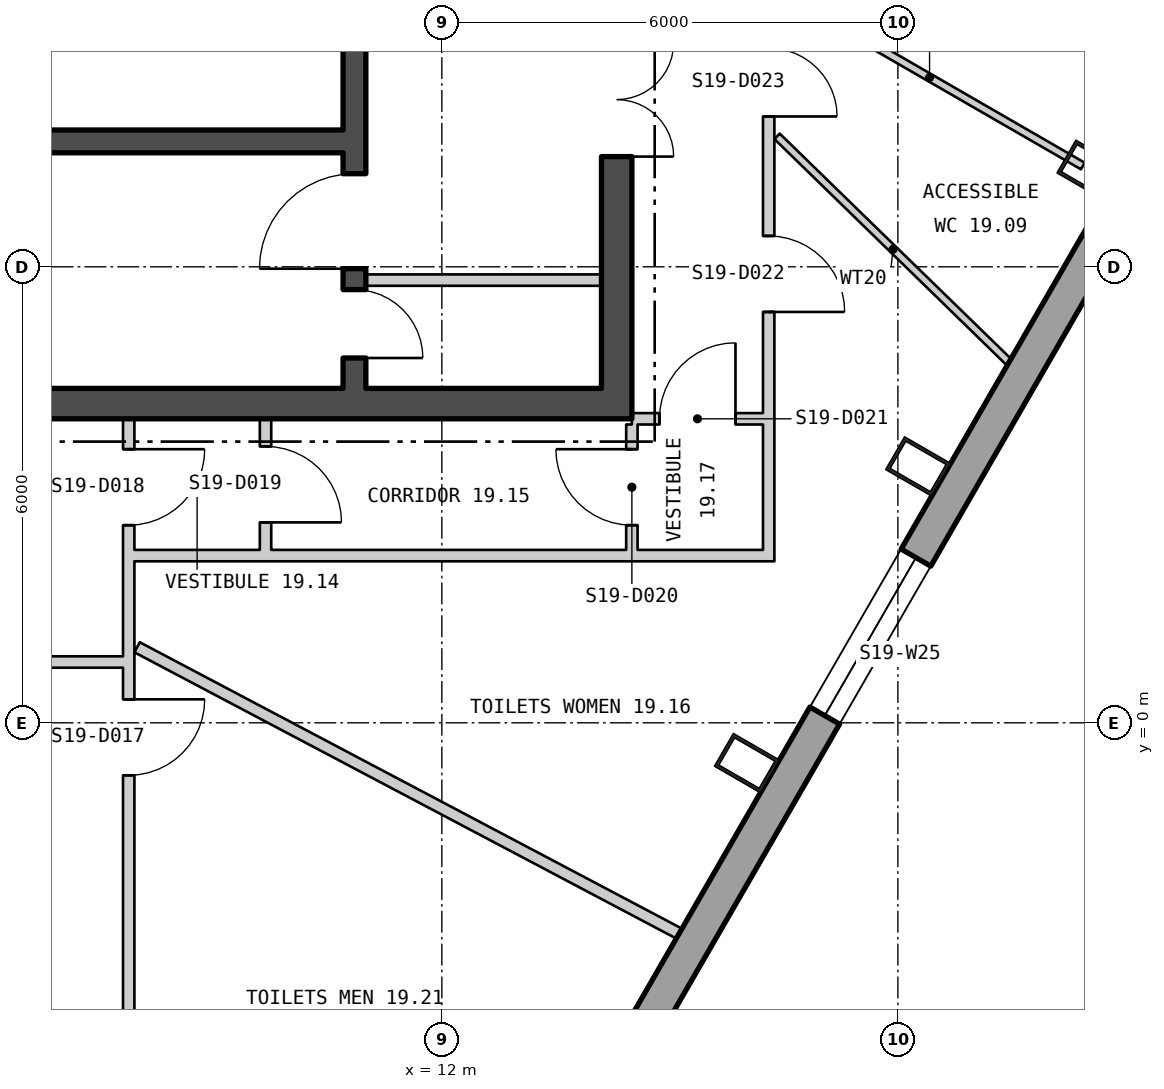
"""IFC4 building model, lengths in metres.
Left out: names, types, materials, properties, quantities, classifications, styles, units other than length and angle.
Written with IfcOpenShell. Run it as: python <this file> out.ifc"""

import sys

from ifc_helpers import new_model, si_unit, direction, frame, frame_2d, origin, origin_2d, place, context, subcontext, project, spatial, polyline, rectangle, hollow_rectangle, outline, extrude, element, fill, save


model = new_model("IFC4")
c1 = context("Model", 3, precision=1e-05, world=origin(), true_north=direction((0.0, 1.0)))
c2 = subcontext(c1, "Body", "Model", "MODEL_VIEW")
j1 = project(units=[si_unit("LENGTHUNIT", "METRE"), si_unit("PLANEANGLEUNIT", "RADIAN")], contexts=[c1])
p1 = place(None, origin())
s1 = spatial("IfcSite", under=j1, at=p1, CompositionType="ELEMENT")
p2 = place(p1, origin())
s2 = spatial("IfcBuilding", under=s1, at=p2, CompositionType="ELEMENT")
p3 = place(p2, frame((0.0, 0.0, 257.1)))
s3 = spatial("IfcBuildingStorey", under=s2, at=p3, CompositionType="ELEMENT", Elevation=257.1)
for number, where, z_axis, x_axis in (
    (1, (16.013, -0.53, 0.0), (0.0, 0.0, 1.0), (0.5, 0.866, 0.0)),
    (2, (18.266, 3.373, 0.0), (0.0, 0.0, 1.0), (0.5, 0.866, 0.0)),
    (3, (20.52, 7.276, 0.0), (0.0, 0.0, 1.0), (0.5, 0.866, 0.0)),
):
    element("IfcColumn", number, at=place(p3, frame(where, z_axis=z_axis, x_axis=x_axis)), inside=s3, PredefinedType="COLUMN", context=c2, shape_type="SweptSolid", body=[
        extrude(hollow_rectangle(XDim=0.5, YDim=0.7, WallThickness=0.045, at=origin_2d()), origin(), (0.0, 0.0, 1.0), 3.9),
    ])
p4 = place(p3, frame((2.825, -24.522, -0.18), z_axis=(0.0, 0.0, 1.0), x_axis=(0.500000141277, 0.866025322218, 0.0)))
e4 = element("IfcWall", 4, at=p4, inside=s3, PredefinedType="SOLIDWALL", context=c2, shape_type="SweptSolid", body=[
    extrude(outline(polyline([(-0.13, -0.225), (45.86, -0.225), (45.6, 0.225), (0.13, 0.225), (-0.13, -0.225)])), origin(), (0.0, 0.0, 1.0), 3.68),
])
p5 = place(p4, frame((1.424, 0.0, 1.08)))
e5 = element("IfcOpeningElement", 5, at=p5, cuts=e4, PredefinedType="OPENING", context=c2, shape_type="SweptSolid", body=[
    extrude(rectangle(XDim=2.4, YDim=2.0, at=frame_2d((1.2, 1.0))), frame((0.0, 0.235, 0.0), z_axis=(0.0, -1.0, 0.0), x_axis=(1.0, 0.0, 0.0)), (0.0, 0.0, 1.0), 0.47),
])
p6 = place(p4, frame((5.892, 0.0, 1.08)))
e6 = element("IfcOpeningElement", 6, at=p6, cuts=e4, PredefinedType="OPENING", context=c2, shape_type="SweptSolid", body=[
    extrude(rectangle(XDim=2.4, YDim=2.0, at=frame_2d((1.2, 1.0))), frame((0.0, 0.235, 0.0), z_axis=(0.0, -1.0, 0.0), x_axis=(1.0, 0.0, 0.0)), (0.0, 0.0, 1.0), 0.47),
])
p7 = place(p4, frame((10.399, 0.0, 1.08)))
e7 = element("IfcOpeningElement", 7, at=p7, cuts=e4, PredefinedType="OPENING", context=c2, shape_type="SweptSolid", body=[
    extrude(rectangle(XDim=2.4, YDim=2.0, at=frame_2d((1.2, 1.0))), frame((0.0, 0.235, 0.0), z_axis=(0.0, -1.0, 0.0), x_axis=(1.0, 0.0, 0.0)), (0.0, 0.0, 1.0), 0.47),
])
p8 = place(p4, frame((14.905, 0.0, 1.08)))
e8 = element("IfcOpeningElement", 8, at=p8, cuts=e4, PredefinedType="OPENING", context=c2, shape_type="SweptSolid", body=[
    extrude(rectangle(XDim=2.4, YDim=2.0, at=frame_2d((1.2, 1.0))), frame((0.0, 0.235, 0.0), z_axis=(0.0, -1.0, 0.0), x_axis=(1.0, 0.0, 0.0)), (0.0, 0.0, 1.0), 0.47),
])
p9 = place(p4, frame((19.412, 0.0, 1.08)))
e9 = element("IfcOpeningElement", 9, at=p9, cuts=e4, PredefinedType="OPENING", context=c2, shape_type="SweptSolid", body=[
    extrude(rectangle(XDim=2.4, YDim=2.0, at=frame_2d((1.2, 1.0))), frame((0.0, 0.235, 0.0), z_axis=(0.0, -1.0, 0.0), x_axis=(1.0, 0.0, 0.0)), (0.0, 0.0, 1.0), 0.47),
])
p10 = place(p4, frame((28.425, 0.0, 1.08)))
e10 = element("IfcOpeningElement", 10, at=p10, cuts=e4, PredefinedType="OPENING", context=c2, shape_type="SweptSolid", body=[
    extrude(rectangle(XDim=2.4, YDim=2.0, at=frame_2d((1.2, 1.0))), frame((0.0, 0.235, 0.0), z_axis=(0.0, -1.0, 0.0), x_axis=(1.0, 0.0, 0.0)), (0.0, 0.0, 1.0), 0.47),
])
p11 = place(p4, frame((37.438, 0.0, 1.08)))
e11 = element("IfcOpeningElement", 11, at=p11, cuts=e4, PredefinedType="OPENING", context=c2, shape_type="SweptSolid", body=[
    extrude(rectangle(XDim=2.4, YDim=2.0, at=frame_2d((1.2, 1.0))), frame((0.0, 0.235, 0.0), z_axis=(0.0, -1.0, 0.0), x_axis=(1.0, 0.0, 0.0)), (0.0, 0.0, 1.0), 0.47),
])
p12 = place(p4, frame((41.907, 0.0, 1.08)))
e12 = element("IfcOpeningElement", 12, at=p12, cuts=e4, PredefinedType="OPENING", context=c2, shape_type="SweptSolid", body=[
    extrude(rectangle(XDim=2.4, YDim=2.0, at=frame_2d((1.2, 1.0))), frame((0.0, 0.235, 0.0), z_axis=(0.0, -1.0, 0.0), x_axis=(1.0, 0.0, 0.0)), (0.0, 0.0, 1.0), 0.47),
])
p13 = place(p3, frame((-14.5, 4.2, 0.0), z_axis=(0.0, 0.0, 1.0), x_axis=(1.0, 0.0, 0.0)))
e13 = element("IfcWall", 13, at=p13, inside=s3, PredefinedType="SHEAR", context=c2, shape_type="SweptSolid", body=[
    extrude(rectangle(XDim=29.0, YDim=0.4, at=frame_2d((14.5, 0.0))), origin(), (0.0, 0.0, 1.0), 3.7),
])
p14 = place(p13, frame((9.0, 0.0, 0.0)))
e14 = element("IfcOpeningElement", 14, at=p14, cuts=e13, PredefinedType="OPENING", context=c2, shape_type="SweptSolid", body=[
    extrude(rectangle(XDim=1.8, YDim=2.4, at=frame_2d((0.9, 1.2))), frame((0.0, 0.21, 0.0), z_axis=(0.0, -1.0, 0.0), x_axis=(1.0, 0.0, 0.0)), (0.0, 0.0, 1.0), 0.42),
])
p15 = place(p13, frame((19.0, 0.0, 0.0)))
e15 = element("IfcOpeningElement", 15, at=p15, cuts=e13, PredefinedType="OPENING", context=c2, shape_type="SweptSolid", body=[
    extrude(rectangle(XDim=1.8, YDim=2.4, at=frame_2d((0.9, 1.2))), frame((0.0, 0.21, 0.0), z_axis=(0.0, -1.0, 0.0), x_axis=(1.0, 0.0, 0.0)), (0.0, 0.0, 1.0), 0.42),
])
p16 = place(p3, frame((14.3, 4.4, 0.0), z_axis=(0.0, 0.0, 1.0), x_axis=(0.0, 1.0, 0.0)))
e16 = element("IfcWall", 16, at=p16, inside=s3, PredefinedType="SHEAR", context=c2, shape_type="SweptSolid", body=[
    extrude(rectangle(XDim=13.2, YDim=0.4, at=frame_2d((6.6, 0.0))), origin(), (0.0, 0.0, 1.0), 3.7),
])
p17 = place(p16, frame((3.05, 0.0, 0.0)))
e17 = element("IfcOpeningElement", 17, at=p17, cuts=e16, PredefinedType="OPENING", context=c2, shape_type="SweptSolid", body=[
    extrude(rectangle(XDim=1.5, YDim=2.1, at=frame_2d((0.75, 1.05))), frame((0.0, 0.21, 0.0), z_axis=(0.0, -1.0, 0.0), x_axis=(1.0, 0.0, 0.0)), (0.0, 0.0, 1.0), 0.42),
])
p18 = place(p3, frame((10.85, 4.4, 0.0), z_axis=(0.0, 0.0, 1.0), x_axis=(0.0, 1.0, 0.0)))
e18 = element("IfcWall", 18, at=p18, inside=s3, PredefinedType="SHEAR", context=c2, shape_type="SweptSolid", body=[
    extrude(rectangle(XDim=13.2, YDim=0.3, at=frame_2d((6.6, 0.0))), origin(), (0.0, 0.0, 1.0), 3.7),
])
p19 = place(p18, frame((1.575, 0.0, 0.0)))
e19 = element("IfcOpeningElement", 19, at=p19, cuts=e18, PredefinedType="OPENING", context=c2, shape_type="SweptSolid", body=[
    extrude(rectangle(XDim=1.25, YDim=2.1, at=frame_2d((0.625, 1.05))), frame((0.0, 0.16, 0.0), z_axis=(0.0, -1.0, 0.0), x_axis=(1.0, 0.0, 0.0)), (0.0, 0.0, 1.0), 0.32),
])
p20 = place(p18, frame((0.4, 0.0, 0.0)))
e20 = element("IfcOpeningElement", 20, at=p20, cuts=e18, PredefinedType="OPENING", context=c2, shape_type="SweptSolid", body=[
    extrude(rectangle(XDim=0.9, YDim=2.1, at=frame_2d((0.45, 1.05))), frame((0.0, 0.16, 0.0), z_axis=(0.0, -1.0, 0.0), x_axis=(1.0, 0.0, 0.0)), (0.0, 0.0, 1.0), 0.32),
])
p21 = place(p3, frame((2.6, 7.65, 0.0), z_axis=(0.0, 0.0, 1.0), x_axis=(1.0, 0.0, 0.0)))
e21 = element("IfcWall", 21, at=p21, inside=s3, PredefinedType="SHEAR", context=c2, shape_type="SweptSolid", body=[
    extrude(rectangle(XDim=8.1, YDim=0.3, at=frame_2d((4.05, 0.0))), origin(), (0.0, 0.0, 1.0), 3.7),
])
p22 = place(p3, frame((11.0, 5.825, 0.0), z_axis=(0.0, 0.0, 1.0), x_axis=(1.0, 0.0, 0.0)))
e22 = element("IfcWall", 22, at=p22, inside=s3, PredefinedType="PARTITIONING", context=c2, shape_type="SweptSolid", body=[
    extrude(rectangle(XDim=3.1, YDim=0.15, at=frame_2d((1.55, 0.0))), origin(), (0.0, 0.0, 1.0), 3.7),
])
p23 = place(p3, frame((-7.805, 0.8, 0.0), z_axis=(0.0, 0.0, 1.0), x_axis=(1.0, 0.0, 0.0)))
e23 = element("IfcWall", 23, at=p23, inside=s3, PredefinedType="PARTITIONING", context=c2, shape_type="SweptSolid", body=[
    extrude(rectangle(XDim=15.61, YDim=0.15, at=frame_2d((7.805, 0.0))), origin(), (0.0, 0.0, 1.0), 3.7),
])
p24 = place(p23, frame((1.168, 0.0, 0.0)))
e24 = element("IfcOpeningElement", 24, at=p24, cuts=e23, PredefinedType="OPENING", context=c2, shape_type="SweptSolid", body=[
    extrude(rectangle(XDim=1.0, YDim=2.1, at=frame_2d((0.5, 1.05))), frame((0.0, 0.085, 0.0), z_axis=(0.0, -1.0, 0.0), x_axis=(1.0, 0.0, 0.0)), (0.0, 0.0, 1.0), 0.17),
])
p25 = place(p23, frame((6.399, 0.0, 0.0)))
e25 = element("IfcOpeningElement", 25, at=p25, cuts=e23, PredefinedType="OPENING", context=c2, shape_type="SweptSolid", body=[
    extrude(rectangle(XDim=1.0, YDim=2.1, at=frame_2d((0.5, 1.05))), frame((0.0, 0.085, 0.0), z_axis=(0.0, -1.0, 0.0), x_axis=(1.0, 0.0, 0.0)), (0.0, 0.0, 1.0), 0.17),
])
p26 = place(p23, frame((8.006, 0.0, 0.0)))
e26 = element("IfcOpeningElement", 26, at=p26, cuts=e23, PredefinedType="OPENING", context=c2, shape_type="SweptSolid", body=[
    extrude(rectangle(XDim=1.0, YDim=2.1, at=frame_2d((0.5, 1.05))), frame((0.0, 0.085, 0.0), z_axis=(0.0, -1.0, 0.0), x_axis=(1.0, 0.0, 0.0)), (0.0, 0.0, 1.0), 0.17),
])
p27 = place(p23, frame((13.441, 0.0, 0.0)))
e27 = element("IfcOpeningElement", 27, at=p27, cuts=e23, PredefinedType="OPENING", context=c2, shape_type="SweptSolid", body=[
    extrude(rectangle(XDim=1.0, YDim=2.1, at=frame_2d((0.5, 1.05))), frame((0.0, 0.085, 0.0), z_axis=(0.0, -1.0, 0.0), x_axis=(1.0, 0.0, 0.0)), (0.0, 0.0, 1.0), 0.17),
])
p28 = place(p3, frame((7.88, -13.675, 0.0), z_axis=(0.0, 0.0, 1.0), x_axis=(0.0, 1.0, 0.0)))
e28 = element("IfcWall", 28, at=p28, inside=s3, PredefinedType="PARTITIONING", context=c2, shape_type="SweptSolid", body=[
    extrude(rectangle(XDim=17.675, YDim=0.15, at=frame_2d((8.838, 0.0))), origin(), (0.0, 0.0, 1.0), 3.7),
])
p29 = place(p28, frame((12.984, 0.0, 0.0)))
e29 = element("IfcOpeningElement", 29, at=p29, cuts=e28, PredefinedType="OPENING", context=c2, shape_type="SweptSolid", body=[
    extrude(rectangle(XDim=1.0, YDim=2.1, at=frame_2d((0.5, 1.05))), frame((0.0, 0.085, 0.0), z_axis=(0.0, -1.0, 0.0), x_axis=(1.0, 0.0, 0.0)), (0.0, 0.0, 1.0), 0.17),
])
p30 = place(p28, frame((16.275, 0.0, 0.0)))
e30 = element("IfcOpeningElement", 30, at=p30, cuts=e28, PredefinedType="OPENING", context=c2, shape_type="SweptSolid", body=[
    extrude(rectangle(XDim=1.0, YDim=2.1, at=frame_2d((0.5, 1.05))), frame((0.0, 0.085, 0.0), z_axis=(0.0, -1.0, 0.0), x_axis=(1.0, 0.0, 0.0)), (0.0, 0.0, 1.0), 0.17),
])
p31 = place(p3, frame((7.955, 2.2, 0.0), z_axis=(0.0, 0.0, 1.0), x_axis=(1.0, 0.0, 0.0)))
e31 = element("IfcWall", 31, at=p31, inside=s3, PredefinedType="PARTITIONING", context=c2, shape_type="SweptSolid", body=[
    extrude(rectangle(XDim=8.27, YDim=0.15, at=frame_2d((4.135, 0.0))), origin(), (0.0, 0.0, 1.0), 3.7),
])
p32 = place(p3, frame((7.99, 0.994, 0.0), z_axis=(0.0, 0.0, 1.0), x_axis=(0.88420981039, -0.467089939102, 0.0)))
e32 = element("IfcWall", 32, at=p32, inside=s3, PredefinedType="PARTITIONING", context=c2, shape_type="SweptSolid", body=[
    extrude(rectangle(XDim=8.065, YDim=0.15, at=frame_2d((4.032, 0.0))), origin(), (0.0, 0.0, 1.0), 3.7),
])
p33 = place(p3, frame((9.68, 2.275, 0.0), z_axis=(0.0, 0.0, 1.0), x_axis=(0.0, 1.0, 0.0)))
e33 = element("IfcWall", 33, at=p33, inside=s3, PredefinedType="PARTITIONING", context=c2, shape_type="SweptSolid", body=[
    extrude(rectangle(XDim=1.725, YDim=0.15, at=frame_2d((0.863, 0.0))), origin(), (0.0, 0.0, 1.0), 3.7),
])
p34 = place(p33, frame((0.362, 0.0, 0.0)))
e34 = element("IfcOpeningElement", 34, at=p34, cuts=e33, PredefinedType="OPENING", context=c2, shape_type="SweptSolid", body=[
    extrude(rectangle(XDim=1.0, YDim=2.1, at=frame_2d((0.5, 1.05))), frame((0.0, 0.085, 0.0), z_axis=(0.0, -1.0, 0.0), x_axis=(1.0, 0.0, 0.0)), (0.0, 0.0, 1.0), 0.17),
])
p35 = place(p3, frame((14.5, 2.275, 0.0), z_axis=(0.0, 0.0, 1.0), x_axis=(0.0, 1.0, 0.0)))
e35 = element("IfcWall", 35, at=p35, inside=s3, PredefinedType="PARTITIONING", context=c2, shape_type="SweptSolid", body=[
    extrude(rectangle(XDim=1.65, YDim=0.15, at=frame_2d((0.825, 0.0))), origin(), (0.0, 0.0, 1.0), 3.7),
])
p36 = place(p35, frame((0.325, 0.0, 0.0)))
e36 = element("IfcOpeningElement", 36, at=p36, cuts=e35, PredefinedType="OPENING", context=c2, shape_type="SweptSolid", body=[
    extrude(rectangle(XDim=1.0, YDim=2.1, at=frame_2d((0.5, 1.05))), frame((0.0, 0.085, 0.0), z_axis=(0.0, -1.0, 0.0), x_axis=(1.0, 0.0, 0.0)), (0.0, 0.0, 1.0), 0.17),
])
p37 = place(p3, frame((14.5, 4.0, 0.0), z_axis=(0.0, 0.0, 1.0), x_axis=(1.0, 0.0, 0.0)))
e37 = element("IfcWall", 37, at=p37, inside=s3, PredefinedType="PARTITIONING", context=c2, shape_type="SweptSolid", body=[
    extrude(rectangle(XDim=1.725, YDim=0.15, at=frame_2d((0.863, 0.0))), origin(), (0.0, 0.0, 1.0), 3.16),
])
p38 = place(p37, frame((0.363, 0.0, 0.0)))
e38 = element("IfcOpeningElement", 38, at=p38, cuts=e37, PredefinedType="OPENING", context=c2, shape_type="SweptSolid", body=[
    extrude(rectangle(XDim=1.0, YDim=2.1, at=frame_2d((0.5, 1.05))), frame((0.0, 0.085, 0.0), z_axis=(0.0, -1.0, 0.0), x_axis=(1.0, 0.0, 0.0)), (0.0, 0.0, 1.0), 0.17),
])
p39 = place(p3, frame((16.3, 2.125, 0.0), z_axis=(0.0, 0.0, 1.0), x_axis=(0.0, 1.0, 0.0)))
e39 = element("IfcWall", 39, at=p39, inside=s3, PredefinedType="PARTITIONING", context=c2, shape_type="SweptSolid", body=[
    extrude(rectangle(XDim=17.622, YDim=0.15, at=frame_2d((8.811, 0.0))), origin(), (0.0, 0.0, 1.0), 3.7),
])
p40 = place(p39, frame((3.281, 0.0, 0.0)))
e40 = element("IfcOpeningElement", 40, at=p40, cuts=e39, PredefinedType="OPENING", context=c2, shape_type="SweptSolid", body=[
    extrude(rectangle(XDim=1.0, YDim=2.1, at=frame_2d((0.5, 1.05))), frame((0.0, 0.085, 0.0), z_axis=(0.0, -1.0, 0.0), x_axis=(1.0, 0.0, 0.0)), (0.0, 0.0, 1.0), 0.17),
])
p41 = place(p39, frame((5.853, 0.0, 0.0)))
e41 = element("IfcOpeningElement", 41, at=p41, cuts=e39, PredefinedType="OPENING", context=c2, shape_type="SweptSolid", body=[
    extrude(rectangle(XDim=0.9, YDim=2.1, at=frame_2d((0.45, 1.05))), frame((0.0, 0.085, 0.0), z_axis=(0.0, -1.0, 0.0), x_axis=(1.0, 0.0, 0.0)), (0.0, 0.0, 1.0), 0.17),
])
p42 = place(p39, frame((8.692, 0.0, 0.0)))
e42 = element("IfcOpeningElement", 42, at=p42, cuts=e39, PredefinedType="OPENING", context=c2, shape_type="SweptSolid", body=[
    extrude(rectangle(XDim=1.0, YDim=2.1, at=frame_2d((0.5, 1.05))), frame((0.0, 0.085, 0.0), z_axis=(0.0, -1.0, 0.0), x_axis=(1.0, 0.0, 0.0)), (0.0, 0.0, 1.0), 0.17),
])
p43 = place(p39, frame((13.611, 0.0, 0.0)))
e43 = element("IfcOpeningElement", 43, at=p43, cuts=e39, PredefinedType="OPENING", context=c2, shape_type="SweptSolid", body=[
    extrude(rectangle(XDim=1.0, YDim=2.1, at=frame_2d((0.5, 1.05))), frame((0.0, 0.085, 0.0), z_axis=(0.0, -1.0, 0.0), x_axis=(1.0, 0.0, 0.0)), (0.0, 0.0, 1.0), 0.17),
])
p44 = place(p3, frame((16.4, 9.654, 0.0), z_axis=(0.0, 0.0, 1.0), x_axis=(0.86606758311, -0.499926936147, 0.0)))
e44 = element("IfcWall", 44, at=p44, inside=s3, PredefinedType="PARTITIONING", context=c2, shape_type="SweptSolid", body=[
    extrude(rectangle(XDim=4.657, YDim=0.1, at=frame_2d((2.328, 0.0))), origin(), (0.0, 0.0, 1.0), 3.7),
])
p45 = place(p3, frame((16.41, 7.717, 0.0), z_axis=(0.0, 0.0, 1.0), x_axis=(0.716434135664, -0.697654734991, 0.0)))
e45 = element("IfcWall", 45, at=p45, inside=s3, PredefinedType="PARTITIONING", context=c2, shape_type="SweptSolid", body=[
    extrude(rectangle(XDim=4.26, YDim=0.1, at=frame_2d((2.13, 0.0))), origin(), (0.0, 0.0, 1.0), 3.7),
])
p46 = place(p10, origin())
e46 = element("IfcWindow", 46, at=p46, inside=s3, PartitioningType="SINGLE_PANEL", PredefinedType="WINDOW", context=c2, shape_type="SweptSolid", body=[
    extrude(rectangle(XDim=2.4, YDim=2.0, at=frame_2d((1.2, 1.0))), frame((0.0, 0.105, 0.0), z_axis=(0.0, -1.0, 0.0), x_axis=(1.0, 0.0, 0.0)), (0.0, 0.0, 1.0), 0.06),
])
fill(e10, e46)
p47 = place(p19, origin())
e47 = element("IfcDoor", 47, at=p47, inside=s3, OperationType="SINGLE_SWING_RIGHT", PredefinedType="DOOR", context=c2, shape_type="SweptSolid", body=[
    extrude(rectangle(XDim=1.25, YDim=2.1, at=frame_2d((0.625, 1.05))), frame((0.0, 0.025, 0.0), z_axis=(0.0, -1.0, 0.0), x_axis=(1.0, 0.0, 0.0)), (0.0, 0.0, 1.0), 0.05),
])
fill(e19, e47)
p48 = place(p17, origin())
e48 = element("IfcDoor", 48, at=p48, inside=s3, OperationType="DOUBLE_DOOR_SINGLE_SWING", PredefinedType="DOOR", context=c2, shape_type="SweptSolid", body=[
    extrude(rectangle(XDim=1.5, YDim=2.1, at=frame_2d((0.75, 1.05))), frame((0.0, 0.025, 0.0), z_axis=(0.0, -1.0, 0.0), x_axis=(1.0, 0.0, 0.0)), (0.0, 0.0, 1.0), 0.05),
])
fill(e17, e48)
p49 = place(p20, origin())
e49 = element("IfcDoor", 49, at=p49, inside=s3, OperationType="SINGLE_SWING_LEFT", PredefinedType="DOOR", context=c2, shape_type="SweptSolid", body=[
    extrude(rectangle(XDim=0.9, YDim=2.1, at=frame_2d((0.45, 1.05))), frame((0.0, 0.025, 0.0), z_axis=(0.0, -1.0, 0.0), x_axis=(1.0, 0.0, 0.0)), (0.0, 0.0, 1.0), 0.05),
])
fill(e20, e49)
p50 = place(p29, origin())
e50 = element("IfcDoor", 50, at=p50, inside=s3, OperationType="SINGLE_SWING_RIGHT", PredefinedType="DOOR", context=c2, shape_type="SweptSolid", body=[
    extrude(rectangle(XDim=1.0, YDim=2.1, at=frame_2d((0.5, 1.05))), frame((0.0, 0.025, 0.0), z_axis=(0.0, -1.0, 0.0), x_axis=(1.0, 0.0, 0.0)), (0.0, 0.0, 1.0), 0.05),
])
fill(e29, e50)
p51 = place(p30, origin())
e51 = element("IfcDoor", 51, at=p51, inside=s3, OperationType="SINGLE_SWING_RIGHT", PredefinedType="DOOR", context=c2, shape_type="SweptSolid", body=[
    extrude(rectangle(XDim=1.0, YDim=2.1, at=frame_2d((0.5, 1.05))), frame((0.0, 0.025, 0.0), z_axis=(0.0, -1.0, 0.0), x_axis=(1.0, 0.0, 0.0)), (0.0, 0.0, 1.0), 0.05),
])
fill(e30, e51)
p52 = place(p34, origin())
e52 = element("IfcDoor", 52, at=p52, inside=s3, OperationType="SINGLE_SWING_LEFT", PredefinedType="DOOR", context=c2, shape_type="SweptSolid", body=[
    extrude(rectangle(XDim=1.0, YDim=2.1, at=frame_2d((0.5, 1.05))), frame((0.0, 0.025, 0.0), z_axis=(0.0, -1.0, 0.0), x_axis=(1.0, 0.0, 0.0)), (0.0, 0.0, 1.0), 0.05),
])
fill(e34, e52)
p53 = place(p36, origin())
e53 = element("IfcDoor", 53, at=p53, inside=s3, OperationType="SINGLE_SWING_LEFT", PredefinedType="DOOR", context=c2, shape_type="SweptSolid", body=[
    extrude(rectangle(XDim=1.0, YDim=2.1, at=frame_2d((0.5, 1.05))), frame((0.0, 0.025, 0.0), z_axis=(0.0, -1.0, 0.0), x_axis=(1.0, 0.0, 0.0)), (0.0, 0.0, 1.0), 0.05),
])
fill(e36, e53)
p54 = place(p38, origin())
e54 = element("IfcDoor", 54, at=p54, inside=s3, OperationType="SINGLE_SWING_LEFT", PredefinedType="DOOR", context=c2, shape_type="SweptSolid", body=[
    extrude(rectangle(XDim=1.0, YDim=2.1, at=frame_2d((0.5, 1.05))), frame((0.0, 0.025, 0.0), z_axis=(0.0, -1.0, 0.0), x_axis=(1.0, 0.0, 0.0)), (0.0, 0.0, 1.0), 0.05),
])
fill(e38, e54)
p55 = place(p40, origin())
e55 = element("IfcDoor", 55, at=p55, inside=s3, OperationType="SINGLE_SWING_LEFT", PredefinedType="DOOR", context=c2, shape_type="SweptSolid", body=[
    extrude(rectangle(XDim=1.0, YDim=2.1, at=frame_2d((0.5, 1.05))), frame((0.0, 0.025, 0.0), z_axis=(0.0, -1.0, 0.0), x_axis=(1.0, 0.0, 0.0)), (0.0, 0.0, 1.0), 0.05),
])
fill(e40, e55)
p56 = place(p41, origin())
e56 = element("IfcDoor", 56, at=p56, inside=s3, OperationType="SINGLE_SWING_LEFT", PredefinedType="DOOR", context=c2, shape_type="SweptSolid", body=[
    extrude(rectangle(XDim=0.9, YDim=2.1, at=frame_2d((0.45, 1.05))), frame((0.0, 0.025, 0.0), z_axis=(0.0, -1.0, 0.0), x_axis=(1.0, 0.0, 0.0)), (0.0, 0.0, 1.0), 0.05),
])
fill(e41, e56)
save(model, sys.argv[1])
